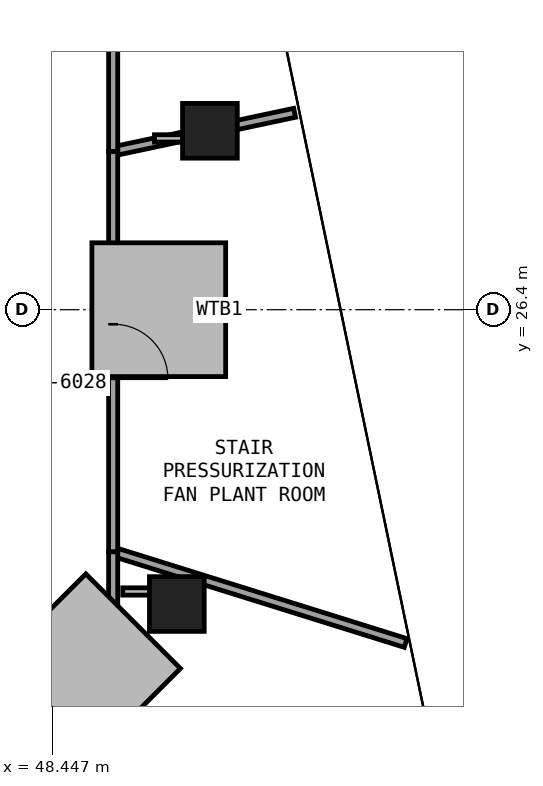
"""IFC4 building model, lengths in metres.
Left out: names, types, materials, properties, quantities, classifications, styles, units other than length and angle.
Written with IfcOpenShell. Run it as: python <this file> out.ifc"""

import sys

from ifc_helpers import new_model, si_unit, direction, frame, frame_2d, origin, origin_2d, place, context, subcontext, project, spatial, rectangle, extrude, element, fill, save


model = new_model("IFC4")
c1 = context("Model", 3, precision=1e-05, world=origin(), true_north=direction((0.0, 1.0)))
c2 = subcontext(c1, "Body", "Model", "MODEL_VIEW")
j1 = project(units=[si_unit("LENGTHUNIT", "METRE"), si_unit("PLANEANGLEUNIT", "RADIAN")], contexts=[c1])
p1 = place(None, origin())
s1 = spatial("IfcSite", under=j1, at=p1, CompositionType="ELEMENT")
p2 = place(p1, origin())
s2 = spatial("IfcBuilding", under=s1, at=p2, CompositionType="ELEMENT")
p3 = place(p2, frame((0.0, 0.0, 223.8)))
s3 = spatial("IfcBuildingStorey", under=s2, at=p3, CompositionType="ELEMENT", Elevation=223.8)
for number, where, z_axis, x_axis in (
    (1, (51.041, 29.342, 0.0), (0.0, 0.0, 1.0), (1.0, 0.0, 0.0)),
    (2, (50.497, 21.56, 0.0), (0.0, 0.0, 1.0), (1.0, 0.0, 0.0)),
):
    element("IfcColumn", number, at=place(p3, frame(where, z_axis=z_axis, x_axis=x_axis)), inside=s3, PredefinedType="COLUMN", context=c2, shape_type="SweptSolid", body=[
        extrude(rectangle(XDim=0.9, YDim=0.9, at=origin_2d()), origin(), (0.0, 0.0, 1.0), 4.14),
    ])
p4 = place(p3, frame((54.26, 20.919, 0.0), z_axis=(0.0, 0.0, 1.0), x_axis=(-0.954602320973, 0.297883213346, 0.0)))
e3 = element("IfcWall", 3, at=p4, inside=s3, PredefinedType="PARTITIONING", context=c2, shape_type="SweptSolid", body=[
    extrude(rectangle(XDim=5.039, YDim=0.15, at=frame_2d((2.52, 0.0))), origin(), (0.0, 0.0, 1.0), 3.725),
])
p5 = place(p3, frame((49.45, 22.42, 0.0), z_axis=(0.0, 0.0, 1.0), x_axis=(0.0, -1.0, 0.0)))
e4 = element("IfcWall", 4, at=p5, inside=s3, PredefinedType="PARTITIONING", context=c2, shape_type="SweptSolid", body=[
    extrude(rectangle(XDim=3.82, YDim=0.15, at=frame_2d((1.91, 0.0))), origin(), (0.0, 0.0, 1.0), 3.125),
])
p6 = place(p3, frame((52.434, 29.638, 0.0), z_axis=(0.0, 0.0, 1.0), x_axis=(-0.978165155449, -0.207829085225, 0.0)))
e5 = element("IfcWall", 5, at=p6, inside=s3, PredefinedType="PARTITIONING", context=c2, shape_type="SweptSolid", body=[
    extrude(rectangle(XDim=3.051, YDim=0.15, at=frame_2d((1.525, 0.0))), origin(), (0.0, 0.0, 1.0), 3.125),
])
p7 = place(p3, frame((49.45, 29.004, 0.0), z_axis=(0.0, 0.0, 1.0), x_axis=(0.0, -1.0, 0.0)))
e6 = element("IfcWall", 6, at=p7, inside=s3, PredefinedType="PARTITIONING", context=c2, shape_type="SweptSolid", body=[
    extrude(rectangle(XDim=6.584, YDim=0.15, at=frame_2d((3.292, 0.0))), origin(), (0.0, 0.0, 1.0), 3.125),
])
p8 = place(p7, frame((2.842, 0.0, 0.0)))
e7 = element("IfcOpeningElement", 7, at=p8, cuts=e6, PredefinedType="OPENING", context=c2, shape_type="SweptSolid", body=[
    extrude(rectangle(XDim=0.9, YDim=2.0, at=frame_2d((0.45, 1.0))), frame((0.0, 0.085, 0.0), z_axis=(0.0, -1.0, 0.0), x_axis=(1.0, 0.0, 0.0)), (0.0, 0.0, 1.0), 0.17),
])
p9 = place(p3, frame((49.45, 34.2, 0.0), z_axis=(0.0, 0.0, 1.0), x_axis=(0.0, -1.0, 0.0)))
e8 = element("IfcWall", 8, at=p9, inside=s3, PredefinedType="PARTITIONING", context=c2, shape_type="SweptSolid", body=[
    extrude(rectangle(XDim=5.196, YDim=0.15, at=frame_2d((2.598, 0.0))), origin(), (0.0, 0.0, 1.0), 3.125),
])
p10 = place(p9, frame((2.148, 0.0, 0.0)))
e9 = element("IfcOpeningElement", 9, at=p10, cuts=e8, PredefinedType="OPENING", context=c2, shape_type="SweptSolid", body=[
    extrude(rectangle(XDim=0.9, YDim=2.0, at=frame_2d((0.45, 1.0))), frame((0.0, 0.085, 0.0), z_axis=(0.0, -1.0, 0.0), x_axis=(1.0, 0.0, 0.0)), (0.0, 0.0, 1.0), 0.17),
])
p11 = place(p8, origin())
e10 = element("IfcDoor", 10, at=p11, inside=s3, OperationType="SINGLE_SWING_RIGHT", PredefinedType="DOOR", context=c2, shape_type="SweptSolid", body=[
    extrude(rectangle(XDim=0.9, YDim=2.0, at=frame_2d((0.45, 1.0))), frame((0.0, 0.025, 0.0), z_axis=(0.0, -1.0, 0.0), x_axis=(1.0, 0.0, 0.0)), (0.0, 0.0, 1.0), 0.05),
])
fill(e7, e10)
save(model, sys.argv[1])
